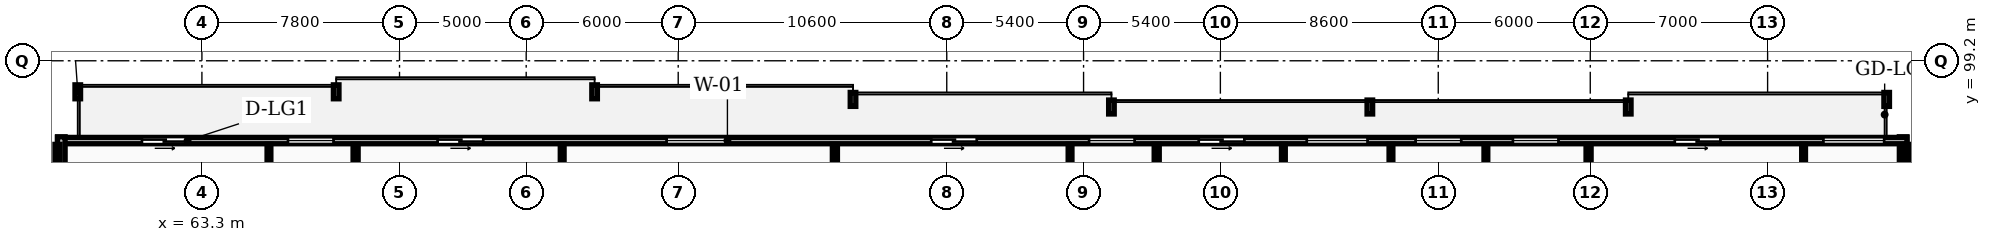
"""IFC4 building model, lengths in metres.
Left out: names, types, materials, properties, quantities, classifications, styles, units other than length and angle.
Written with IfcOpenShell. Run it as: python <this file> out.ifc"""

import sys

from ifc_helpers import new_model, si_unit, direction, frame, frame_2d, origin, place, context, subcontext, project, spatial, rectangle, extrude, element, fill, save


model = new_model("IFC4")
c1 = context("Model", 3, precision=1e-05, world=origin(), true_north=direction((0.0, 1.0)))
c2 = subcontext(c1, "Body", "Model", "MODEL_VIEW")
j1 = project(units=[si_unit("LENGTHUNIT", "METRE"), si_unit("PLANEANGLEUNIT", "RADIAN")], contexts=[c1])
p1 = place(None, origin())
s1 = spatial("IfcSite", under=j1, at=p1, CompositionType="ELEMENT")
p2 = place(p1, origin())
s2 = spatial("IfcBuilding", under=s1, at=p2, CompositionType="ELEMENT")
p3 = place(p2, frame((0.0, 0.0, 87.3)))
s3 = spatial("IfcBuildingStorey", under=s2, at=p3, CompositionType="ELEMENT", Elevation=87.3)
p4 = place(p3, frame((130.45, 92.6, 0.0), z_axis=(0.0, 0.0, 1.0), x_axis=(0.0, 1.0, 0.0)))
e1 = element("IfcWall", 1, at=p4, inside=s3, PredefinedType="STANDARD", context=c2, shape_type="SweptSolid", body=[
    extrude(rectangle(XDim=3.6, YDim=0.3, at=frame_2d((1.8, 0.0))), origin(), (0.0, 0.0, 1.0), 2.97),
])
p5 = place(p3, frame((130.6, 96.05, 0.0), z_axis=(0.0, 0.0, 1.0), x_axis=(-1.0, 0.0, 0.0)))
e2 = element("IfcWall", 2, at=p5, inside=s3, PredefinedType="STANDARD", context=c2, shape_type="SweptSolid", body=[
    extrude(rectangle(XDim=73.0, YDim=0.25, at=frame_2d((36.5, 0.0))), origin(), (0.0, 0.0, 1.0), 2.97),
])
p6 = place(p5, frame((67.867, 0.0, 0.0)))
e3 = element("IfcOpeningElement", 3, at=p6, cuts=e2, PredefinedType="OPENING", context=c2, shape_type="SweptSolid", body=[
    extrude(rectangle(XDim=1.8, YDim=2.2, at=frame_2d((0.9, 1.1))), frame((0.0, 0.135, 0.0), z_axis=(0.0, -1.0, 0.0), x_axis=(1.0, 0.0, 0.0)), (0.0, 0.0, 1.0), 0.27),
])
p7 = place(p5, frame((62.103, 0.0, 0.85)))
e4 = element("IfcOpeningElement", 4, at=p7, cuts=e2, PredefinedType="OPENING", context=c2, shape_type="SweptSolid", body=[
    extrude(rectangle(XDim=1.8, YDim=1.8, at=frame_2d((0.9, 0.9))), frame((0.0, 0.135, 0.0), z_axis=(0.0, -1.0, 0.0), x_axis=(1.0, 0.0, 0.0)), (0.0, 0.0, 1.0), 0.27),
])
p8 = place(p5, frame((56.196, 0.0, 0.0)))
e5 = element("IfcOpeningElement", 5, at=p8, cuts=e2, PredefinedType="OPENING", context=c2, shape_type="SweptSolid", body=[
    extrude(rectangle(XDim=1.8, YDim=2.2, at=frame_2d((0.9, 1.1))), frame((0.0, 0.135, 0.0), z_axis=(0.0, -1.0, 0.0), x_axis=(1.0, 0.0, 0.0)), (0.0, 0.0, 1.0), 0.27),
])
p9 = place(p5, frame((46.557, 0.0, 0.85)))
e6 = element("IfcOpeningElement", 6, at=p9, cuts=e2, PredefinedType="OPENING", context=c2, shape_type="SweptSolid", body=[
    extrude(rectangle(XDim=2.4, YDim=1.9, at=frame_2d((1.2, 0.95))), frame((0.0, 0.135, 0.0), z_axis=(0.0, -1.0, 0.0), x_axis=(1.0, 0.0, 0.0)), (0.0, 0.0, 1.0), 0.27),
])
p10 = place(p5, frame((36.714, 0.0, 0.0)))
e7 = element("IfcOpeningElement", 7, at=p10, cuts=e2, PredefinedType="OPENING", context=c2, shape_type="SweptSolid", body=[
    extrude(rectangle(XDim=1.8, YDim=2.2, at=frame_2d((0.9, 1.1))), frame((0.0, 0.135, 0.0), z_axis=(0.0, -1.0, 0.0), x_axis=(1.0, 0.0, 0.0)), (0.0, 0.0, 1.0), 0.27),
])
p11 = place(p5, frame((30.483, 0.0, 0.85)))
e8 = element("IfcOpeningElement", 8, at=p11, cuts=e2, PredefinedType="OPENING", context=c2, shape_type="SweptSolid", body=[
    extrude(rectangle(XDim=1.8, YDim=1.8, at=frame_2d((0.9, 0.9))), frame((0.0, 0.135, 0.0), z_axis=(0.0, -1.0, 0.0), x_axis=(1.0, 0.0, 0.0)), (0.0, 0.0, 1.0), 0.27),
])
p12 = place(p5, frame((21.29, 0.0, 0.85)))
e9 = element("IfcOpeningElement", 9, at=p12, cuts=e2, PredefinedType="OPENING", context=c2, shape_type="SweptSolid", body=[
    extrude(rectangle(XDim=2.4, YDim=1.9, at=frame_2d((1.2, 0.95))), frame((0.0, 0.135, 0.0), z_axis=(0.0, -1.0, 0.0), x_axis=(1.0, 0.0, 0.0)), (0.0, 0.0, 1.0), 0.27),
])
p13 = place(p5, frame((17.593, 0.0, 0.85)))
e10 = element("IfcOpeningElement", 10, at=p13, cuts=e2, PredefinedType="OPENING", context=c2, shape_type="SweptSolid", body=[
    extrude(rectangle(XDim=1.8, YDim=1.8, at=frame_2d((0.9, 0.9))), frame((0.0, 0.135, 0.0), z_axis=(0.0, -1.0, 0.0), x_axis=(1.0, 0.0, 0.0)), (0.0, 0.0, 1.0), 0.27),
])
p14 = place(p5, frame((26.153, 0.0, 0.0)))
e11 = element("IfcOpeningElement", 11, at=p14, cuts=e2, PredefinedType="OPENING", context=c2, shape_type="SweptSolid", body=[
    extrude(rectangle(XDim=1.8, YDim=2.2, at=frame_2d((0.9, 1.1))), frame((0.0, 0.135, 0.0), z_axis=(0.0, -1.0, 0.0), x_axis=(1.0, 0.0, 0.0)), (0.0, 0.0, 1.0), 0.27),
])
p15 = place(p5, frame((13.753, 0.0, 0.85)))
e12 = element("IfcOpeningElement", 12, at=p15, cuts=e2, PredefinedType="OPENING", context=c2, shape_type="SweptSolid", body=[
    extrude(rectangle(XDim=1.8, YDim=1.8, at=frame_2d((0.9, 0.9))), frame((0.0, 0.135, 0.0), z_axis=(0.0, -1.0, 0.0), x_axis=(1.0, 0.0, 0.0)), (0.0, 0.0, 1.0), 0.27),
])
p16 = place(p5, frame((7.363, 0.0, 0.0)))
e13 = element("IfcOpeningElement", 13, at=p16, cuts=e2, PredefinedType="OPENING", context=c2, shape_type="SweptSolid", body=[
    extrude(rectangle(XDim=1.8, YDim=2.2, at=frame_2d((0.9, 1.1))), frame((0.0, 0.135, 0.0), z_axis=(0.0, -1.0, 0.0), x_axis=(1.0, 0.0, 0.0)), (0.0, 0.0, 1.0), 0.27),
])
p17 = place(p5, frame((0.9, 0.0, 0.85)))
e14 = element("IfcOpeningElement", 14, at=p17, cuts=e2, PredefinedType="OPENING", context=c2, shape_type="SweptSolid", body=[
    extrude(rectangle(XDim=2.4, YDim=1.9, at=frame_2d((1.2, 0.95))), frame((0.0, 0.135, 0.0), z_axis=(0.0, -1.0, 0.0), x_axis=(1.0, 0.0, 0.0)), (0.0, 0.0, 1.0), 0.27),
])
p18 = place(p3, frame((57.75, 96.2, 0.0), z_axis=(0.0, 0.0, 1.0), x_axis=(0.0, -1.0, 0.0)))
e15 = element("IfcWall", 15, at=p18, inside=s3, PredefinedType="STANDARD", context=c2, shape_type="SweptSolid", body=[
    extrude(rectangle(XDim=3.6, YDim=0.3, at=frame_2d((1.8, 0.0))), origin(), (0.0, 0.0, 1.0), 2.97),
])
for number, where, z_axis, x_axis in (
    (16, (57.6, 69.43, 0.0), (0.0, 0.0, 1.0), (0.0, 1.0, 0.0)),
    (17, (130.6, 69.43, 0.0), (0.0, 0.0, 1.0), (0.0, 1.0, 0.0)),
    (18, (69.367, 69.43, 0.0), (0.0, 0.0, 1.0), (0.0, 1.0, 0.0)),
):
    element("IfcWall", number, at=place(p3, frame(where, z_axis=z_axis, x_axis=x_axis)), inside=s3, PredefinedType="PARTITIONING", context=c2, shape_type="SweptSolid", body=[
        extrude(rectangle(XDim=26.47, YDim=0.2, at=frame_2d((13.235, 0.0))), origin(), (0.0, 0.0, 1.0), 2.97),
    ])
p19 = place(p3, frame((65.947, 85.59, 0.0), z_axis=(0.0, 0.0, 1.0), x_axis=(0.0, 1.0, 0.0)))
e19 = element("IfcWall", 19, at=p19, inside=s3, PredefinedType="PARTITIONING", context=c2, shape_type="SweptSolid", body=[
    extrude(rectangle(XDim=10.31, YDim=0.15, at=frame_2d((5.155, 0.0))), origin(), (0.0, 0.0, 1.0), 2.97),
])
p20 = place(p19, frame((1.43, 0.0, 0.0)))
e20 = element("IfcOpeningElement", 20, at=p20, cuts=e19, PredefinedType="OPENING", context=c2, shape_type="SweptSolid", body=[
    extrude(rectangle(XDim=0.84, YDim=2.04, at=frame_2d((0.42, 1.02))), frame((0.0, 0.085, 0.0), z_axis=(0.0, -1.0, 0.0), x_axis=(1.0, 0.0, 0.0)), (0.0, 0.0, 1.0), 0.17),
])
p21 = place(p19, frame((3.102, 0.0, 0.0)))
e21 = element("IfcOpeningElement", 21, at=p21, cuts=e19, PredefinedType="OPENING", context=c2, shape_type="SweptSolid", body=[
    extrude(rectangle(XDim=0.84, YDim=2.04, at=frame_2d((0.42, 1.02))), frame((0.0, 0.085, 0.0), z_axis=(0.0, -1.0, 0.0), x_axis=(1.0, 0.0, 0.0)), (0.0, 0.0, 1.0), 0.17),
])
p22 = place(p19, frame((7.29, 0.0, 0.0)))
e22 = element("IfcOpeningElement", 22, at=p22, cuts=e19, PredefinedType="OPENING", context=c2, shape_type="SweptSolid", body=[
    extrude(rectangle(XDim=0.88, YDim=2.06, at=frame_2d((0.44, 1.03))), frame((0.0, 0.085, 0.0), z_axis=(0.0, -1.0, 0.0), x_axis=(1.0, 0.0, 0.0)), (0.0, 0.0, 1.0), 0.17),
])
p23 = place(p3, frame((88.285, 69.43, 0.0), z_axis=(0.0, 0.0, 1.0), x_axis=(0.0, 1.0, 0.0)))
e23 = element("IfcWall", 23, at=p23, inside=s3, PredefinedType="PARTITIONING", context=c2, shape_type="SweptSolid", body=[
    extrude(rectangle(XDim=26.47, YDim=0.2, at=frame_2d((13.235, 0.0))), origin(), (0.0, 0.0, 1.0), 2.97),
])
p24 = place(p3, frame((77.521, 90.73, 0.0), z_axis=(0.0, 0.0, 1.0), x_axis=(0.0, 1.0, 0.0)))
e24 = element("IfcWall", 24, at=p24, inside=s3, PredefinedType="PARTITIONING", context=c2, shape_type="SweptSolid", body=[
    extrude(rectangle(XDim=5.17, YDim=0.15, at=frame_2d((2.585, 0.0))), origin(), (0.0, 0.0, 1.0), 2.97),
])
p25 = place(p3, frame((100.987, 69.43, 0.0), z_axis=(0.0, 0.0, 1.0), x_axis=(0.0, 1.0, 0.0)))
e25 = element("IfcWall", 25, at=p25, inside=s3, PredefinedType="PARTITIONING", context=c2, shape_type="SweptSolid", body=[
    extrude(rectangle(XDim=26.47, YDim=0.2, at=frame_2d((13.235, 0.0))), origin(), (0.0, 0.0, 1.0), 2.97),
])
p26 = place(p3, frame((97.567, 85.59, 0.0), z_axis=(0.0, 0.0, 1.0), x_axis=(0.0, 1.0, 0.0)))
e26 = element("IfcWall", 26, at=p26, inside=s3, PredefinedType="PARTITIONING", context=c2, shape_type="SweptSolid", body=[
    extrude(rectangle(XDim=10.31, YDim=0.15, at=frame_2d((5.155, 0.0))), origin(), (0.0, 0.0, 1.0), 2.97),
])
p27 = place(p26, frame((1.43, 0.0, 0.0)))
e27 = element("IfcOpeningElement", 27, at=p27, cuts=e26, PredefinedType="OPENING", context=c2, shape_type="SweptSolid", body=[
    extrude(rectangle(XDim=0.84, YDim=2.04, at=frame_2d((0.42, 1.02))), frame((0.0, 0.085, 0.0), z_axis=(0.0, -1.0, 0.0), x_axis=(1.0, 0.0, 0.0)), (0.0, 0.0, 1.0), 0.17),
])
p28 = place(p26, frame((3.92, 0.0, 0.0)))
e28 = element("IfcOpeningElement", 28, at=p28, cuts=e26, PredefinedType="OPENING", context=c2, shape_type="SweptSolid", body=[
    extrude(rectangle(XDim=0.84, YDim=2.04, at=frame_2d((0.42, 1.02))), frame((0.0, 0.085, 0.0), z_axis=(0.0, -1.0, 0.0), x_axis=(1.0, 0.0, 0.0)), (0.0, 0.0, 1.0), 0.17),
])
p29 = place(p26, frame((5.48, 0.0, 0.0)))
e29 = element("IfcOpeningElement", 29, at=p29, cuts=e26, PredefinedType="OPENING", context=c2, shape_type="SweptSolid", body=[
    extrude(rectangle(XDim=0.88, YDim=2.06, at=frame_2d((0.44, 1.03))), frame((0.0, 0.085, 0.0), z_axis=(0.0, -1.0, 0.0), x_axis=(1.0, 0.0, 0.0)), (0.0, 0.0, 1.0), 0.17),
])
p30 = place(p3, frame((118.033, 69.43, 0.0), z_axis=(0.0, 0.0, 1.0), x_axis=(0.0, 1.0, 0.0)))
e30 = element("IfcWall", 30, at=p30, inside=s3, PredefinedType="PARTITIONING", context=c2, shape_type="SweptSolid", body=[
    extrude(rectangle(XDim=26.47, YDim=0.2, at=frame_2d((13.235, 0.0))), origin(), (0.0, 0.0, 1.0), 2.97),
])
p31 = place(p3, frame((110.234, 90.73, 0.0), z_axis=(0.0, 0.0, 1.0), x_axis=(0.0, 1.0, 0.0)))
e31 = element("IfcWall", 31, at=p31, inside=s3, PredefinedType="PARTITIONING", context=c2, shape_type="SweptSolid", body=[
    extrude(rectangle(XDim=5.17, YDim=0.15, at=frame_2d((2.585, 0.0))), origin(), (0.0, 0.0, 1.0), 2.97),
])
p32 = place(p3, frame((105.987, 85.59, 0.0), z_axis=(0.0, 0.0, 1.0), x_axis=(0.0, 1.0, 0.0)))
e32 = element("IfcWall", 32, at=p32, inside=s3, PredefinedType="PARTITIONING", context=c2, shape_type="SweptSolid", body=[
    extrude(rectangle(XDim=10.31, YDim=0.15, at=frame_2d((5.155, 0.0))), origin(), (0.0, 0.0, 1.0), 2.97),
])
p33 = place(p32, frame((3.82, 0.0, 0.0)))
e33 = element("IfcOpeningElement", 33, at=p33, cuts=e32, PredefinedType="OPENING", context=c2, shape_type="SweptSolid", body=[
    extrude(rectangle(XDim=0.92, YDim=2.08, at=frame_2d((0.46, 1.04))), frame((0.0, 0.085, 0.0), z_axis=(0.0, -1.0, 0.0), x_axis=(1.0, 0.0, 0.0)), (0.0, 0.0, 1.0), 0.17),
])
p34 = place(p3, frame((113.98, 88.21, 0.0), z_axis=(0.0, 0.0, 1.0), x_axis=(0.0, 1.0, 0.0)))
e34 = element("IfcWall", 34, at=p34, inside=s3, PredefinedType="PARTITIONING", context=c2, shape_type="SweptSolid", body=[
    extrude(rectangle(XDim=7.69, YDim=0.15, at=frame_2d((3.845, 0.0))), origin(), (0.0, 0.0, 1.0), 2.97),
])
p35 = place(p34, frame((0.41, 0.0, 0.0)))
e35 = element("IfcOpeningElement", 35, at=p35, cuts=e34, PredefinedType="OPENING", context=c2, shape_type="SweptSolid", body=[
    extrude(rectangle(XDim=0.92, YDim=2.08, at=frame_2d((0.46, 1.04))), frame((0.0, 0.085, 0.0), z_axis=(0.0, -1.0, 0.0), x_axis=(1.0, 0.0, 0.0)), (0.0, 0.0, 1.0), 0.17),
])
p36 = place(p3, frame((126.52, 85.59, 0.0), z_axis=(0.0, 0.0, 1.0), x_axis=(0.0, 1.0, 0.0)))
e36 = element("IfcWall", 36, at=p36, inside=s3, PredefinedType="PARTITIONING", context=c2, shape_type="SweptSolid", body=[
    extrude(rectangle(XDim=10.31, YDim=0.15, at=frame_2d((5.155, 0.0))), origin(), (0.0, 0.0, 1.0), 2.97),
])
p37 = place(p36, frame((1.43, 0.0, 0.0)))
e37 = element("IfcOpeningElement", 37, at=p37, cuts=e36, PredefinedType="OPENING", context=c2, shape_type="SweptSolid", body=[
    extrude(rectangle(XDim=0.84, YDim=2.04, at=frame_2d((0.42, 1.02))), frame((0.0, 0.085, 0.0), z_axis=(0.0, -1.0, 0.0), x_axis=(1.0, 0.0, 0.0)), (0.0, 0.0, 1.0), 0.17),
])
p38 = place(p36, frame((3.102, 0.0, 0.0)))
e38 = element("IfcOpeningElement", 38, at=p38, cuts=e36, PredefinedType="OPENING", context=c2, shape_type="SweptSolid", body=[
    extrude(rectangle(XDim=0.84, YDim=2.04, at=frame_2d((0.42, 1.02))), frame((0.0, 0.085, 0.0), z_axis=(0.0, -1.0, 0.0), x_axis=(1.0, 0.0, 0.0)), (0.0, 0.0, 1.0), 0.17),
])
p39 = place(p36, frame((7.29, 0.0, 0.0)))
e39 = element("IfcOpeningElement", 39, at=p39, cuts=e36, PredefinedType="OPENING", context=c2, shape_type="SweptSolid", body=[
    extrude(rectangle(XDim=0.88, YDim=2.06, at=frame_2d((0.44, 1.03))), frame((0.0, 0.085, 0.0), z_axis=(0.0, -1.0, 0.0), x_axis=(1.0, 0.0, 0.0)), (0.0, 0.0, 1.0), 0.17),
])
p40 = place(p6, origin())
e40 = element("IfcDoor", 40, at=p40, inside=s3, OperationType="SLIDING_TO_LEFT", PredefinedType="DOOR", context=c2, shape_type="SweptSolid", body=[
    extrude(rectangle(XDim=1.8, YDim=2.2, at=frame_2d((0.9, 1.1))), frame((0.0, 0.025, 0.0), z_axis=(0.0, -1.0, 0.0), x_axis=(1.0, 0.0, 0.0)), (0.0, 0.0, 1.0), 0.05),
])
fill(e3, e40)
p41 = place(p7, origin())
e41 = element("IfcWindow", 41, at=p41, inside=s3, PartitioningType="SINGLE_PANEL", PredefinedType="WINDOW", context=c2, shape_type="SweptSolid", body=[
    extrude(rectangle(XDim=1.8, YDim=1.8, at=frame_2d((0.9, 0.9))), frame((0.0, 0.03, 0.0), z_axis=(0.0, -1.0, 0.0), x_axis=(1.0, 0.0, 0.0)), (0.0, 0.0, 1.0), 0.06),
])
fill(e4, e41)
p42 = place(p8, origin())
e42 = element("IfcDoor", 42, at=p42, inside=s3, OperationType="SLIDING_TO_LEFT", PredefinedType="DOOR", context=c2, shape_type="SweptSolid", body=[
    extrude(rectangle(XDim=1.8, YDim=2.2, at=frame_2d((0.9, 1.1))), frame((0.0, 0.025, 0.0), z_axis=(0.0, -1.0, 0.0), x_axis=(1.0, 0.0, 0.0)), (0.0, 0.0, 1.0), 0.05),
])
fill(e5, e42)
p43 = place(p9, origin())
e43 = element("IfcWindow", 43, at=p43, inside=s3, PartitioningType="DOUBLE_PANEL_VERTICAL", PredefinedType="WINDOW", context=c2, shape_type="SweptSolid", body=[
    extrude(rectangle(XDim=2.4, YDim=1.9, at=frame_2d((1.2, 0.95))), frame((0.0, 0.03, 0.0), z_axis=(0.0, -1.0, 0.0), x_axis=(1.0, 0.0, 0.0)), (0.0, 0.0, 1.0), 0.06),
])
fill(e6, e43)
p44 = place(p10, origin())
e44 = element("IfcDoor", 44, at=p44, inside=s3, OperationType="SLIDING_TO_LEFT", PredefinedType="DOOR", context=c2, shape_type="SweptSolid", body=[
    extrude(rectangle(XDim=1.8, YDim=2.2, at=frame_2d((0.9, 1.1))), frame((0.0, 0.025, 0.0), z_axis=(0.0, -1.0, 0.0), x_axis=(1.0, 0.0, 0.0)), (0.0, 0.0, 1.0), 0.05),
])
fill(e7, e44)
p45 = place(p11, origin())
e45 = element("IfcWindow", 45, at=p45, inside=s3, PartitioningType="SINGLE_PANEL", PredefinedType="WINDOW", context=c2, shape_type="SweptSolid", body=[
    extrude(rectangle(XDim=1.8, YDim=1.8, at=frame_2d((0.9, 0.9))), frame((0.0, 0.03, 0.0), z_axis=(0.0, -1.0, 0.0), x_axis=(1.0, 0.0, 0.0)), (0.0, 0.0, 1.0), 0.06),
])
fill(e8, e45)
p46 = place(p12, origin())
e46 = element("IfcWindow", 46, at=p46, inside=s3, PartitioningType="DOUBLE_PANEL_VERTICAL", PredefinedType="WINDOW", context=c2, shape_type="SweptSolid", body=[
    extrude(rectangle(XDim=2.4, YDim=1.9, at=frame_2d((1.2, 0.95))), frame((0.0, 0.03, 0.0), z_axis=(0.0, -1.0, 0.0), x_axis=(1.0, 0.0, 0.0)), (0.0, 0.0, 1.0), 0.06),
])
fill(e9, e46)
p47 = place(p13, origin())
e47 = element("IfcWindow", 47, at=p47, inside=s3, PartitioningType="SINGLE_PANEL", PredefinedType="WINDOW", context=c2, shape_type="SweptSolid", body=[
    extrude(rectangle(XDim=1.8, YDim=1.8, at=frame_2d((0.9, 0.9))), frame((0.0, 0.03, 0.0), z_axis=(0.0, -1.0, 0.0), x_axis=(1.0, 0.0, 0.0)), (0.0, 0.0, 1.0), 0.06),
])
fill(e10, e47)
p48 = place(p14, origin())
e48 = element("IfcDoor", 48, at=p48, inside=s3, OperationType="SLIDING_TO_LEFT", PredefinedType="DOOR", context=c2, shape_type="SweptSolid", body=[
    extrude(rectangle(XDim=1.8, YDim=2.2, at=frame_2d((0.9, 1.1))), frame((0.0, 0.025, 0.0), z_axis=(0.0, -1.0, 0.0), x_axis=(1.0, 0.0, 0.0)), (0.0, 0.0, 1.0), 0.05),
])
fill(e11, e48)
p49 = place(p15, origin())
e49 = element("IfcWindow", 49, at=p49, inside=s3, PartitioningType="SINGLE_PANEL", PredefinedType="WINDOW", context=c2, shape_type="SweptSolid", body=[
    extrude(rectangle(XDim=1.8, YDim=1.8, at=frame_2d((0.9, 0.9))), frame((0.0, 0.03, 0.0), z_axis=(0.0, -1.0, 0.0), x_axis=(1.0, 0.0, 0.0)), (0.0, 0.0, 1.0), 0.06),
])
fill(e12, e49)
p50 = place(p16, origin())
e50 = element("IfcDoor", 50, at=p50, inside=s3, OperationType="SLIDING_TO_LEFT", PredefinedType="DOOR", context=c2, shape_type="SweptSolid", body=[
    extrude(rectangle(XDim=1.8, YDim=2.2, at=frame_2d((0.9, 1.1))), frame((0.0, 0.025, 0.0), z_axis=(0.0, -1.0, 0.0), x_axis=(1.0, 0.0, 0.0)), (0.0, 0.0, 1.0), 0.05),
])
fill(e13, e50)
p51 = place(p17, origin())
e51 = element("IfcWindow", 51, at=p51, inside=s3, PartitioningType="DOUBLE_PANEL_VERTICAL", PredefinedType="WINDOW", context=c2, shape_type="SweptSolid", body=[
    extrude(rectangle(XDim=2.4, YDim=1.9, at=frame_2d((1.2, 0.95))), frame((0.0, 0.03, 0.0), z_axis=(0.0, -1.0, 0.0), x_axis=(1.0, 0.0, 0.0)), (0.0, 0.0, 1.0), 0.06),
])
fill(e14, e51)
save(model, sys.argv[1])
